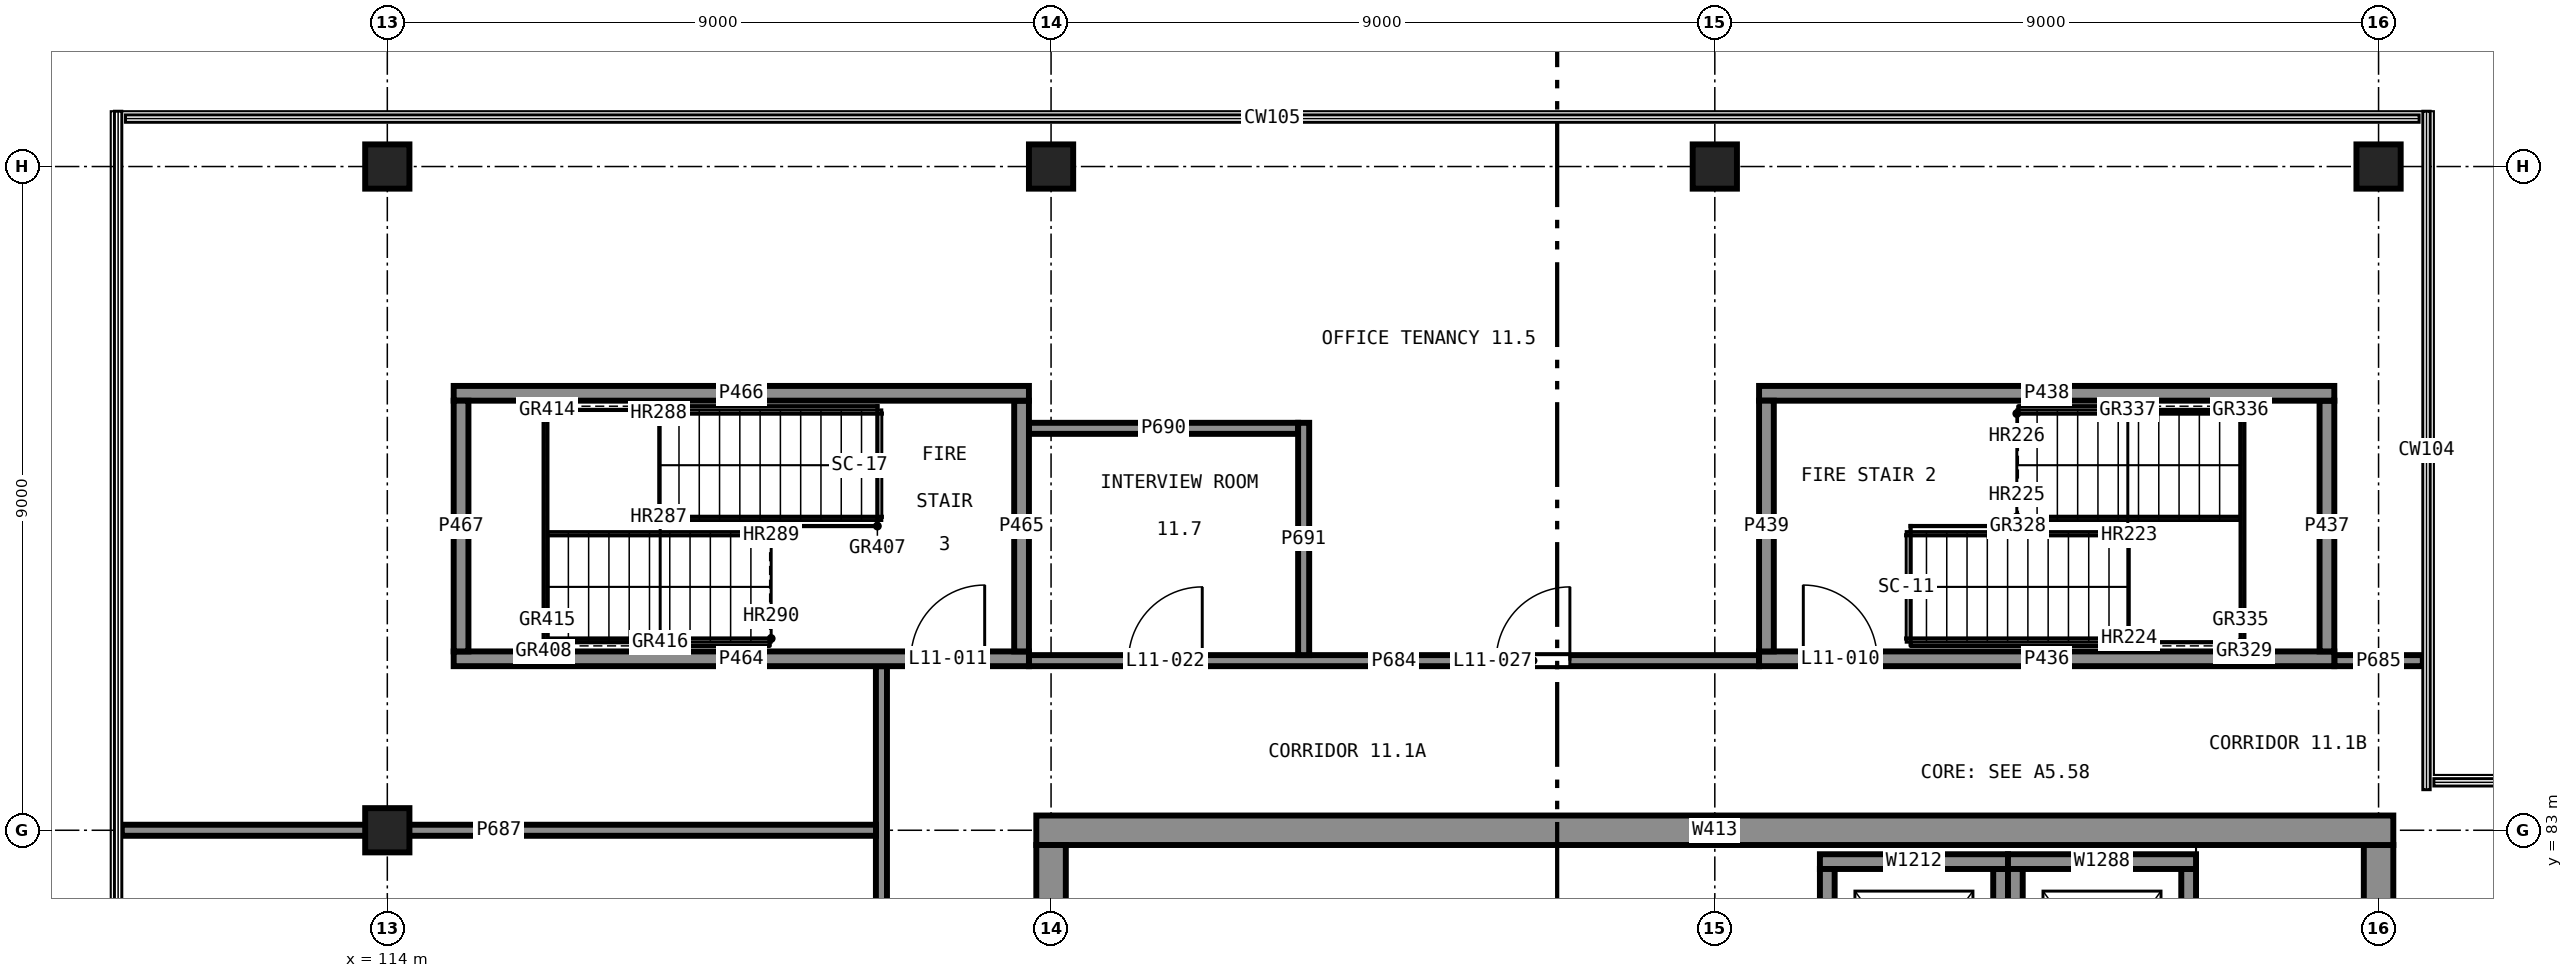
"""IFC4 building model, lengths in metres.
Left out: names, types, materials, properties, quantities, classifications, styles, units other than length and angle.
Written with IfcOpenShell. Run it as: python <this file> out.ifc"""

import sys

from ifc_helpers import new_model, si_unit, direction, frame, frame_2d, origin, origin_2d, place, context, subcontext, project, spatial, rectangle, extrude, element, fill, save


model = new_model("IFC4")
c1 = context("Model", 3, precision=1e-05, world=origin(), true_north=direction((0.0, 1.0)))
c2 = subcontext(c1, "Body", "Model", "MODEL_VIEW")
j1 = project(units=[si_unit("LENGTHUNIT", "METRE"), si_unit("PLANEANGLEUNIT", "RADIAN")], contexts=[c1])
p1 = place(None, origin())
s1 = spatial("IfcSite", under=j1, at=p1, CompositionType="ELEMENT")
p2 = place(p1, origin())
s2 = spatial("IfcBuilding", under=s1, at=p2, CompositionType="ELEMENT")
p3 = place(p2, frame((0.0, 0.0, 45.5)))
s3 = spatial("IfcBuildingStorey", under=s2, at=p3, CompositionType="ELEMENT", Elevation=45.5)
for number, where, z_axis, x_axis in (
    (1, (114.0, 83.0, 0.0), (0.0, 0.0, 1.0), (1.0, 0.0, 0.0)),
    (2, (114.0, 92.0, 0.0), (0.0, 0.0, 1.0), (1.0, 0.0, 0.0)),
    (3, (123.0, 92.0, 0.0), (0.0, 0.0, 1.0), (1.0, 0.0, 0.0)),
    (4, (132.0, 92.0, 0.0), (0.0, 0.0, 1.0), (1.0, 0.0, 0.0)),
    (5, (141.0, 92.0, 0.0), (0.0, 0.0, 1.0), (1.0, 0.0, 0.0)),
):
    element("IfcColumn", number, at=place(p3, frame(where, z_axis=z_axis, x_axis=x_axis)), inside=s3, PredefinedType="COLUMN", context=c2, shape_type="SweptSolid", body=[
        extrude(rectangle(XDim=0.6, YDim=0.6, at=origin_2d()), origin(), (0.0, 0.0, 1.0), 4.0),
    ])
p4 = place(p3, frame((141.0, 65.2, 0.0), z_axis=(0.0, 0.0, 1.0), x_axis=(0.0, 1.0, 0.0)))
e6 = element("IfcWall", 6, at=p4, inside=s3, PredefinedType="SHEAR", context=c2, shape_type="SweptSolid", body=[
    extrude(rectangle(XDim=17.6, YDim=0.4, at=frame_2d((8.8, 0.0))), origin(), (0.0, 0.0, 1.0), 4.0),
])
p5 = place(p4, frame((4.325, 0.0, 0.0)))
e7 = element("IfcOpeningElement", 7, at=p5, cuts=e6, PredefinedType="OPENING", context=c2, shape_type="SweptSolid", body=[
    extrude(rectangle(XDim=1.2, YDim=2.1, at=frame_2d((0.6, 1.05))), frame((0.0, 0.21, 0.0), z_axis=(0.0, -1.0, 0.0), x_axis=(1.0, 0.0, 0.0)), (0.0, 0.0, 1.0), 0.42),
])
p6 = place(p4, frame((12.075, 0.0, 0.0)))
e8 = element("IfcOpeningElement", 8, at=p6, cuts=e6, PredefinedType="OPENING", context=c2, shape_type="SweptSolid", body=[
    extrude(rectangle(XDim=1.2, YDim=2.1, at=frame_2d((0.6, 1.05))), frame((0.0, 0.21, 0.0), z_axis=(0.0, -1.0, 0.0), x_axis=(1.0, 0.0, 0.0)), (0.0, 0.0, 1.0), 0.42),
])
p7 = place(p3, frame((141.2, 83.0, 0.0), z_axis=(0.0, 0.0, 1.0), x_axis=(-1.0, 0.0, 0.0)))
e9 = element("IfcWall", 9, at=p7, inside=s3, PredefinedType="SHEAR", context=c2, shape_type="SweptSolid", body=[
    extrude(rectangle(XDim=18.4, YDim=0.4, at=frame_2d((9.2, 0.0))), origin(), (0.0, 0.0, 1.0), 4.0),
])
p8 = place(p3, frame((123.0, 82.8, 0.0), z_axis=(0.0, 0.0, 1.0), x_axis=(0.0, -1.0, 0.0)))
e10 = element("IfcWall", 10, at=p8, inside=s3, PredefinedType="SHEAR", context=c2, shape_type="SweptSolid", body=[
    extrude(rectangle(XDim=17.6, YDim=0.4, at=frame_2d((8.8, 0.0))), origin(), (0.0, 0.0, 1.0), 4.0),
])
p9 = place(p8, frame((12.075, 0.0, 0.0)))
e11 = element("IfcOpeningElement", 11, at=p9, cuts=e10, PredefinedType="OPENING", context=c2, shape_type="SweptSolid", body=[
    extrude(rectangle(XDim=1.2, YDim=2.1, at=frame_2d((0.6, 1.05))), frame((0.0, 0.21, 0.0), z_axis=(0.0, -1.0, 0.0), x_axis=(1.0, 0.0, 0.0)), (0.0, 0.0, 1.0), 0.42),
])
p10 = place(p8, frame((4.325, 0.0, 0.0)))
e12 = element("IfcOpeningElement", 12, at=p10, cuts=e10, PredefinedType="OPENING", context=c2, shape_type="SweptSolid", body=[
    extrude(rectangle(XDim=1.2, YDim=2.1, at=frame_2d((0.6, 1.05))), frame((0.0, 0.21, 0.0), z_axis=(0.0, -1.0, 0.0), x_axis=(1.0, 0.0, 0.0)), (0.0, 0.0, 1.0), 0.42),
])
p11 = place(p3, frame((135.875, 79.675, 0.0), z_axis=(0.0, 0.0, 1.0), x_axis=(0.0, 1.0, 0.0)))
e13 = element("IfcWall", 13, at=p11, inside=s3, PredefinedType="SHEAR", context=c2, shape_type="SweptSolid", body=[
    extrude(rectangle(XDim=2.8, YDim=0.2, at=frame_2d((1.4, 0.0))), origin(), (0.0, 0.0, 1.0), 4.0),
])
p12 = place(p3, frame((135.975, 82.575, 0.0), z_axis=(0.0, 0.0, 1.0), x_axis=(-1.0, 0.0, 0.0)))
e14 = element("IfcWall", 14, at=p12, inside=s3, PredefinedType="SHEAR", context=c2, shape_type="SweptSolid", body=[
    extrude(rectangle(XDim=2.55, YDim=0.2, at=frame_2d((1.275, 0.0))), origin(), (0.0, 0.0, 1.0), 4.0),
])
for number, where, z_axis, x_axis in (
    (15, (133.525, 82.475, 0.0), (0.0, 0.0, 1.0), (0.0, -1.0, 0.0)),
    (16, (138.425, 79.675, 0.0), (0.0, 0.0, 1.0), (0.0, 1.0, 0.0)),
):
    element("IfcWall", number, at=place(p3, frame(where, z_axis=z_axis, x_axis=x_axis)), inside=s3, PredefinedType="SHEAR", context=c2, shape_type="SweptSolid", body=[
        extrude(rectangle(XDim=2.8, YDim=0.2, at=frame_2d((1.4, 0.0))), origin(), (0.0, 0.0, 1.0), 4.0),
    ])
p13 = place(p3, frame((138.525, 82.575, 0.0), z_axis=(0.0, 0.0, 1.0), x_axis=(-1.0, 0.0, 0.0)))
e17 = element("IfcWall", 17, at=p13, inside=s3, PredefinedType="SHEAR", context=c2, shape_type="SweptSolid", body=[
    extrude(rectangle(XDim=2.55, YDim=0.2, at=frame_2d((1.275, 0.0))), origin(), (0.0, 0.0, 1.0), 4.0),
])
p14 = place(p3, frame((136.075, 82.475, 0.0), z_axis=(0.0, 0.0, 1.0), x_axis=(0.0, -1.0, 0.0)))
e18 = element("IfcWall", 18, at=p14, inside=s3, PredefinedType="SHEAR", context=c2, shape_type="SweptSolid", body=[
    extrude(rectangle(XDim=2.8, YDim=0.2, at=frame_2d((1.4, 0.0))), origin(), (0.0, 0.0, 1.0), 4.0),
])
p15 = place(p3, frame((132.6, 85.325, 0.0), z_axis=(0.0, 0.0, 1.0), x_axis=(1.0, 0.0, 0.0)))
e19 = element("IfcWall", 19, at=p15, inside=s3, PredefinedType="SHEAR", context=c2, shape_type="SweptSolid", body=[
    extrude(rectangle(XDim=7.8, YDim=0.2, at=frame_2d((3.9, 0.0))), origin(), (0.0, 0.0, 1.0), 3.75),
])
p16 = place(p15, frame((0.6, 0.0, 0.0)))
e20 = element("IfcOpeningElement", 20, at=p16, cuts=e19, PredefinedType="OPENING", context=c2, shape_type="SweptSolid", body=[
    extrude(rectangle(XDim=1.0, YDim=2.1, at=frame_2d((0.5, 1.05))), frame((0.0, 0.11, 0.0), z_axis=(0.0, -1.0, 0.0), x_axis=(1.0, 0.0, 0.0)), (0.0, 0.0, 1.0), 0.22),
])
p17 = place(p3, frame((140.3, 85.425, 0.0), z_axis=(0.0, 0.0, 1.0), x_axis=(0.0, 1.0, 0.0)))
e21 = element("IfcWall", 21, at=p17, inside=s3, PredefinedType="SHEAR", context=c2, shape_type="SweptSolid", body=[
    extrude(rectangle(XDim=3.4, YDim=0.2, at=frame_2d((1.7, 0.0))), origin(), (0.0, 0.0, 1.0), 3.75),
])
p18 = place(p3, frame((140.4, 88.925, 0.0), z_axis=(0.0, 0.0, 1.0), x_axis=(-1.0, 0.0, 0.0)))
e22 = element("IfcWall", 22, at=p18, inside=s3, PredefinedType="SHEAR", context=c2, shape_type="SweptSolid", body=[
    extrude(rectangle(XDim=7.8, YDim=0.2, at=frame_2d((3.9, 0.0))), origin(), (0.0, 0.0, 1.0), 3.75),
])
p19 = place(p3, frame((132.7, 88.825, 0.0), z_axis=(0.0, 0.0, 1.0), x_axis=(0.0, -1.0, 0.0)))
e23 = element("IfcWall", 23, at=p19, inside=s3, PredefinedType="SHEAR", context=c2, shape_type="SweptSolid", body=[
    extrude(rectangle(XDim=3.4, YDim=0.2, at=frame_2d((1.7, 0.0))), origin(), (0.0, 0.0, 1.0), 3.75),
])
p20 = place(p3, frame((114.9, 85.325, 0.0), z_axis=(0.0, 0.0, 1.0), x_axis=(1.0, 0.0, 0.0)))
e24 = element("IfcWall", 24, at=p20, inside=s3, PredefinedType="SHEAR", context=c2, shape_type="SweptSolid", body=[
    extrude(rectangle(XDim=7.8, YDim=0.2, at=frame_2d((3.9, 0.0))), origin(), (0.0, 0.0, 1.0), 3.75),
])
p21 = place(p20, frame((6.2, 0.0, 0.0)))
e25 = element("IfcOpeningElement", 25, at=p21, cuts=e24, PredefinedType="OPENING", context=c2, shape_type="SweptSolid", body=[
    extrude(rectangle(XDim=1.0, YDim=2.1, at=frame_2d((0.5, 1.05))), frame((0.0, 0.11, 0.0), z_axis=(0.0, -1.0, 0.0), x_axis=(1.0, 0.0, 0.0)), (0.0, 0.0, 1.0), 0.22),
])
p22 = place(p3, frame((122.6, 85.425, 0.0), z_axis=(0.0, 0.0, 1.0), x_axis=(0.0, 1.0, 0.0)))
e26 = element("IfcWall", 26, at=p22, inside=s3, PredefinedType="SHEAR", context=c2, shape_type="SweptSolid", body=[
    extrude(rectangle(XDim=3.4, YDim=0.2, at=frame_2d((1.7, 0.0))), origin(), (0.0, 0.0, 1.0), 3.75),
])
p23 = place(p3, frame((122.7, 88.925, 0.0), z_axis=(0.0, 0.0, 1.0), x_axis=(-1.0, 0.0, 0.0)))
e27 = element("IfcWall", 27, at=p23, inside=s3, PredefinedType="SHEAR", context=c2, shape_type="SweptSolid", body=[
    extrude(rectangle(XDim=7.8, YDim=0.2, at=frame_2d((3.9, 0.0))), origin(), (0.0, 0.0, 1.0), 3.75),
])
p24 = place(p3, frame((115.0, 88.825, 0.0), z_axis=(0.0, 0.0, 1.0), x_axis=(0.0, -1.0, 0.0)))
e28 = element("IfcWall", 28, at=p24, inside=s3, PredefinedType="SHEAR", context=c2, shape_type="SweptSolid", body=[
    extrude(rectangle(XDim=3.4, YDim=0.2, at=frame_2d((1.7, 0.0))), origin(), (0.0, 0.0, 1.0), 3.75),
])
p25 = place(p3, frame((120.7, 64.4, 0.0), z_axis=(0.0, 0.0, 1.0), x_axis=(0.0, 1.0, 0.0)))
e29 = element("IfcWall", 29, at=p25, inside=s3, PredefinedType="PARTITIONING", context=c2, shape_type="SweptSolid", body=[
    extrude(rectangle(XDim=20.825, YDim=0.15, at=frame_2d((10.413, 0.0))), origin(), (0.0, 0.0, 1.0), 3.75),
])
p26 = place(p25, frame((4.413, 0.0, 0.0)))
e30 = element("IfcOpeningElement", 30, at=p26, cuts=e29, PredefinedType="OPENING", context=c2, shape_type="SweptSolid", body=[
    extrude(rectangle(XDim=1.0, YDim=2.1, at=frame_2d((0.5, 1.05))), frame((0.0, 0.085, 0.0), z_axis=(0.0, -1.0, 0.0), x_axis=(1.0, 0.0, 0.0)), (0.0, 0.0, 1.0), 0.17),
])
p27 = place(p25, frame((13.6, 0.0, 0.0)))
e31 = element("IfcOpeningElement", 31, at=p27, cuts=e29, PredefinedType="OPENING", context=c2, shape_type="SweptSolid", body=[
    extrude(rectangle(XDim=1.0, YDim=2.1, at=frame_2d((0.5, 1.05))), frame((0.0, 0.085, 0.0), z_axis=(0.0, -1.0, 0.0), x_axis=(1.0, 0.0, 0.0)), (0.0, 0.0, 1.0), 0.17),
])
p28 = place(p3, frame((122.7, 85.3, 0.0), z_axis=(0.0, 0.0, 1.0), x_axis=(1.0, 0.0, 0.0)))
e32 = element("IfcWall", 32, at=p28, inside=s3, PredefinedType="PARTITIONING", context=c2, shape_type="SweptSolid", body=[
    extrude(rectangle(XDim=9.9, YDim=0.15, at=frame_2d((4.95, 0.0))), origin(), (0.0, 0.0, 1.0), 3.75),
])
p29 = place(p28, frame((1.35, 0.0, 0.0)))
e33 = element("IfcOpeningElement", 33, at=p29, cuts=e32, PredefinedType="OPENING", context=c2, shape_type="SweptSolid", body=[
    extrude(rectangle(XDim=1.0, YDim=2.1, at=frame_2d((0.5, 1.05))), frame((0.0, 0.085, 0.0), z_axis=(0.0, -1.0, 0.0), x_axis=(1.0, 0.0, 0.0)), (0.0, 0.0, 1.0), 0.17),
])
p30 = place(p28, frame((6.335, 0.0, 0.0)))
e34 = element("IfcOpeningElement", 34, at=p30, cuts=e32, PredefinedType="OPENING", context=c2, shape_type="SweptSolid", body=[
    extrude(rectangle(XDim=1.0, YDim=2.1, at=frame_2d((0.5, 1.05))), frame((0.0, 0.085, 0.0), z_axis=(0.0, -1.0, 0.0), x_axis=(1.0, 0.0, 0.0)), (0.0, 0.0, 1.0), 0.17),
])
p31 = place(p3, frame((140.4, 85.3, 0.0), z_axis=(0.0, 0.0, 1.0), x_axis=(1.0, 0.0, 0.0)))
e35 = element("IfcWall", 35, at=p31, inside=s3, PredefinedType="PARTITIONING", context=c2, shape_type="SweptSolid", body=[
    extrude(rectangle(XDim=1.2, YDim=0.15, at=frame_2d((0.6, 0.0))), origin(), (0.0, 0.0, 1.0), 3.75),
])
p32 = place(p3, frame((110.4, 83.0, 0.0), z_axis=(0.0, 0.0, 1.0), x_axis=(1.0, 0.0, 0.0)))
e36 = element("IfcWall", 36, at=p32, inside=s3, PredefinedType="PARTITIONING", context=c2, shape_type="SweptSolid", body=[
    extrude(rectangle(XDim=10.226, YDim=0.15, at=frame_2d((5.113, 0.0))), origin(), (0.0, 0.0, 1.0), 2.85),
])
p33 = place(p3, frame((122.7, 88.45, 0.0), z_axis=(0.0, 0.0, 1.0), x_axis=(1.0, 0.0, 0.0)))
e37 = element("IfcWall", 37, at=p33, inside=s3, PredefinedType="PARTITIONING", context=c2, shape_type="SweptSolid", body=[
    extrude(rectangle(XDim=3.65, YDim=0.15, at=frame_2d((1.825, 0.0))), origin(), (0.0, 0.0, 1.0), 3.75),
])
p34 = place(p3, frame((126.425, 85.375, 0.0), z_axis=(0.0, 0.0, 1.0), x_axis=(0.0, 1.0, 0.0)))
e38 = element("IfcWall", 38, at=p34, inside=s3, PredefinedType="PARTITIONING", context=c2, shape_type="SweptSolid", body=[
    extrude(rectangle(XDim=3.15, YDim=0.15, at=frame_2d((1.575, 0.0))), origin(), (0.0, 0.0, 1.0), 3.75),
])
p35 = place(p16, origin())
e39 = element("IfcDoor", 39, at=p35, inside=s3, OperationType="SINGLE_SWING_RIGHT", PredefinedType="DOOR", context=c2, shape_type="SweptSolid", body=[
    extrude(rectangle(XDim=1.0, YDim=2.1, at=frame_2d((0.5, 1.05))), frame((0.0, 0.025, 0.0), z_axis=(0.0, -1.0, 0.0), x_axis=(1.0, 0.0, 0.0)), (0.0, 0.0, 1.0), 0.05),
])
fill(e20, e39)
p36 = place(p21, origin())
e40 = element("IfcDoor", 40, at=p36, inside=s3, OperationType="SINGLE_SWING_LEFT", PredefinedType="DOOR", context=c2, shape_type="SweptSolid", body=[
    extrude(rectangle(XDim=1.0, YDim=2.1, at=frame_2d((0.5, 1.05))), frame((0.0, 0.025, 0.0), z_axis=(0.0, -1.0, 0.0), x_axis=(1.0, 0.0, 0.0)), (0.0, 0.0, 1.0), 0.05),
])
fill(e25, e40)
p37 = place(p29, origin())
e41 = element("IfcDoor", 41, at=p37, inside=s3, OperationType="SINGLE_SWING_LEFT", PredefinedType="DOOR", context=c2, shape_type="SweptSolid", body=[
    extrude(rectangle(XDim=1.0, YDim=2.1, at=frame_2d((0.5, 1.05))), frame((0.0, 0.025, 0.0), z_axis=(0.0, -1.0, 0.0), x_axis=(1.0, 0.0, 0.0)), (0.0, 0.0, 1.0), 0.05),
])
fill(e33, e41)
p38 = place(p30, origin())
e42 = element("IfcDoor", 42, at=p38, inside=s3, OperationType="SINGLE_SWING_LEFT", PredefinedType="DOOR", context=c2, shape_type="SweptSolid", body=[
    extrude(rectangle(XDim=1.0, YDim=2.1, at=frame_2d((0.5, 1.05))), frame((0.0, 0.025, 0.0), z_axis=(0.0, -1.0, 0.0), x_axis=(1.0, 0.0, 0.0)), (0.0, 0.0, 1.0), 0.05),
])
fill(e34, e42)
save(model, sys.argv[1])
